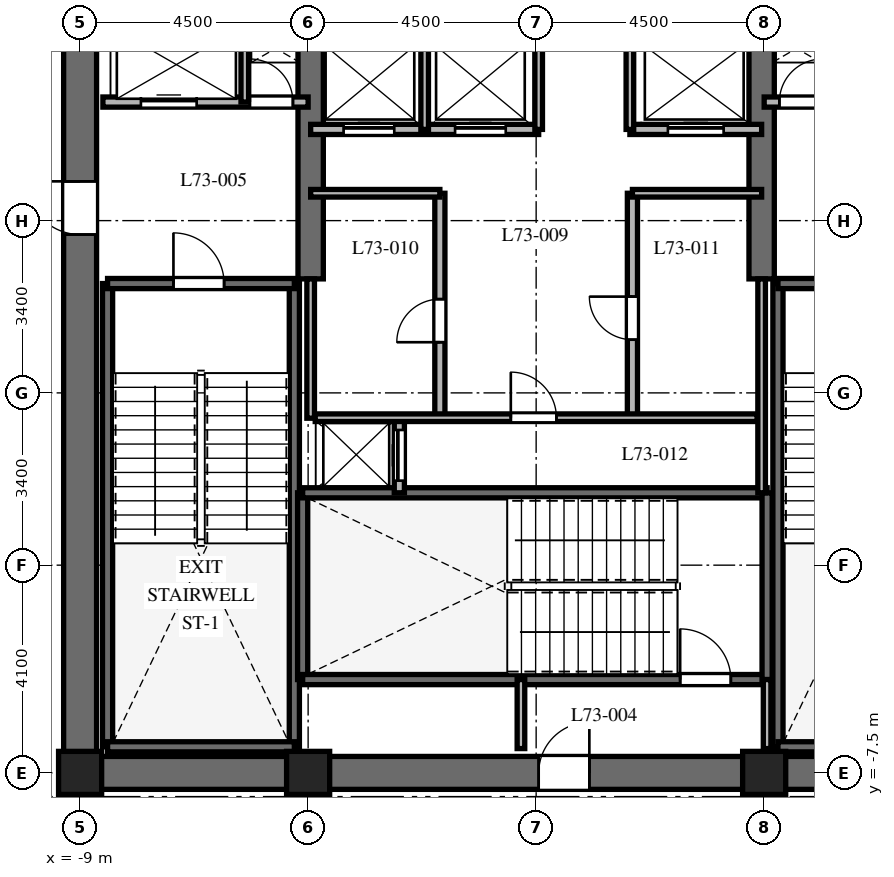
"""IFC4 building model, lengths in metres.
Left out: names, types, materials, properties, quantities, classifications, styles, units other than length and angle.
Written with IfcOpenShell. Run it as: python <this file> out.ifc"""

import sys

from ifc_helpers import new_model, si_unit, direction, frame, frame_2d, origin, origin_2d, place, context, subcontext, project, spatial, rectangle, extrude, element, fill, save


model = new_model("IFC4")
c1 = context("Model", 3, precision=1e-05, world=origin(), true_north=direction((0.0, 1.0)))
c2 = subcontext(c1, "Body", "Model", "MODEL_VIEW")
j1 = project(units=[si_unit("LENGTHUNIT", "METRE"), si_unit("PLANEANGLEUNIT", "RADIAN")], contexts=[c1])
p1 = place(None, origin())
s1 = spatial("IfcSite", under=j1, at=p1, CompositionType="ELEMENT")
p2 = place(p1, origin())
s2 = spatial("IfcBuilding", under=s1, at=p2, CompositionType="ELEMENT")
p3 = place(p2, frame((0.0, 0.0, 293.1)))
s3 = spatial("IfcBuildingStorey", under=s2, at=p3, CompositionType="ELEMENT", Elevation=293.1)
p4 = place(p3, frame((-9.325, -7.5, 0.0), z_axis=(0.0, 0.0, 1.0), x_axis=(1.0, 0.0, 0.0)))
e1 = element("IfcWall", 1, at=p4, inside=s3, PredefinedType="SHEAR", context=c2, shape_type="SweptSolid", body=[
    extrude(rectangle(XDim=18.65, YDim=0.65, at=frame_2d((9.325, 0.0))), origin(), (0.0, 0.0, 1.0), 4.5),
])
p5 = place(p4, frame((9.375, 0.0, 0.0)))
e2 = element("IfcOpeningElement", 2, at=p5, cuts=e1, PredefinedType="OPENING", context=c2, shape_type="SweptSolid", body=[
    extrude(rectangle(XDim=1.0, YDim=2.15, at=frame_2d((0.5, 1.075))), frame((0.0, 0.335, 0.0), z_axis=(0.0, -1.0, 0.0), x_axis=(1.0, 0.0, 0.0)), (0.0, 0.0, 1.0), 0.67),
])
p6 = place(p3, frame((-9.0, -7.175, 0.0), z_axis=(0.0, 0.0, 1.0), x_axis=(0.0, 1.0, 0.0)))
e3 = element("IfcWall", 3, at=p6, inside=s3, PredefinedType="SHEAR", context=c2, shape_type="SweptSolid", body=[
    extrude(rectangle(XDim=14.35, YDim=0.65, at=frame_2d((7.175, 0.0))), origin(), (0.0, 0.0, 1.0), 4.5),
])
p7 = place(p6, frame((10.3, 0.0, 0.0)))
e4 = element("IfcOpeningElement", 4, at=p7, cuts=e3, PredefinedType="OPENING", context=c2, shape_type="SweptSolid", body=[
    extrude(rectangle(XDim=1.05, YDim=2.15, at=frame_2d((0.525, 1.075))), frame((0.0, 0.335, 0.0), z_axis=(0.0, -1.0, 0.0), x_axis=(1.0, 0.0, 0.0)), (0.0, 0.0, 1.0), 0.67),
])
for number, where, z_axis, x_axis in (
    (5, (-4.45, 2.25, 0.0), (0.0, 0.0, 1.0), (0.0, 1.0, 0.0)),
    (6, (4.45, 2.25, 0.0), (0.0, 0.0, 1.0), (0.0, 1.0, 0.0)),
):
    element("IfcWall", number, at=place(p3, frame(where, z_axis=z_axis, x_axis=x_axis)), inside=s3, PredefinedType="SHEAR", context=c2, shape_type="SweptSolid", body=[
        extrude(rectangle(XDim=4.925, YDim=0.5, at=frame_2d((2.462, 0.0))), origin(), (0.0, 0.0, 1.0), 4.5),
    ])
for number, where, z_axis, x_axis in (
    (7, (-8.458, -6.985, 0.0), (0.0, 0.0, 1.0), (0.0, 1.0, 0.0)),
    (8, (-4.772, -6.985, 0.0), (0.0, 0.0, 1.0), (0.0, 1.0, 0.0)),
):
    element("IfcWall", number, at=place(p3, frame(where, z_axis=z_axis, x_axis=x_axis)), inside=s3, PredefinedType="SHEAR", context=c2, shape_type="SweptSolid", body=[
        extrude(rectangle(XDim=9.143, YDim=0.2, at=frame_2d((4.572, 0.0))), origin(), (0.0, 0.0, 1.0), 4.5),
    ])
p8 = place(p3, frame((-8.458, -6.985, 0.0), z_axis=(0.0, 0.0, 1.0), x_axis=(1.0, 0.0, 0.0)))
e9 = element("IfcWall", 9, at=p8, inside=s3, PredefinedType="SHEAR", context=c2, shape_type="SweptSolid", body=[
    extrude(rectangle(XDim=3.686, YDim=0.2, at=frame_2d((1.843, 0.0))), origin(), (0.0, 0.0, 1.0), 4.5),
])
p9 = place(p3, frame((-8.458, 2.158, 0.0), z_axis=(0.0, 0.0, 1.0), x_axis=(1.0, 0.0, 0.0)))
e10 = element("IfcWall", 10, at=p9, inside=s3, PredefinedType="SHEAR", context=c2, shape_type="SweptSolid", body=[
    extrude(rectangle(XDim=3.686, YDim=0.2, at=frame_2d((1.843, 0.0))), origin(), (0.0, 0.0, 1.0), 4.5),
])
p10 = place(p9, frame((1.3, 0.0, 0.0)))
e11 = element("IfcOpeningElement", 11, at=p10, cuts=e10, PredefinedType="OPENING", context=c2, shape_type="SweptSolid", body=[
    extrude(rectangle(XDim=1.0, YDim=2.15, at=frame_2d((0.5, 1.075))), frame((0.0, 0.11, 0.0), z_axis=(0.0, -1.0, 0.0), x_axis=(1.0, 0.0, 0.0)), (0.0, 0.0, 1.0), 0.22),
])
p11 = place(p3, frame((4.772, -6.985, 0.0), z_axis=(0.0, 0.0, 1.0), x_axis=(0.0, 1.0, 0.0)))
e12 = element("IfcWall", 12, at=p11, inside=s3, PredefinedType="SHEAR", context=c2, shape_type="SweptSolid", body=[
    extrude(rectangle(XDim=9.143, YDim=0.2, at=frame_2d((4.572, 0.0))), origin(), (0.0, 0.0, 1.0), 4.5),
])
p12 = place(p3, frame((4.772, -6.985, 0.0), z_axis=(0.0, 0.0, 1.0), x_axis=(1.0, 0.0, 0.0)))
e13 = element("IfcWall", 13, at=p12, inside=s3, PredefinedType="SHEAR", context=c2, shape_type="SweptSolid", body=[
    extrude(rectangle(XDim=3.686, YDim=0.2, at=frame_2d((1.843, 0.0))), origin(), (0.0, 0.0, 1.0), 4.5),
])
p13 = place(p3, frame((4.772, 2.158, 0.0), z_axis=(0.0, 0.0, 1.0), x_axis=(1.0, 0.0, 0.0)))
e14 = element("IfcWall", 14, at=p13, inside=s3, PredefinedType="SHEAR", context=c2, shape_type="SweptSolid", body=[
    extrude(rectangle(XDim=3.686, YDim=0.2, at=frame_2d((1.843, 0.0))), origin(), (0.0, 0.0, 1.0), 4.5),
])
p14 = place(p13, frame((1.35, 0.0, 0.0)))
e15 = element("IfcOpeningElement", 15, at=p14, cuts=e14, PredefinedType="OPENING", context=c2, shape_type="SweptSolid", body=[
    extrude(rectangle(XDim=1.0, YDim=2.15, at=frame_2d((0.5, 1.075))), frame((0.0, 0.11, 0.0), z_axis=(0.0, -1.0, 0.0), x_axis=(1.0, 0.0, 0.0)), (0.0, 0.0, 1.0), 0.22),
])
p15 = place(p3, frame((-4.608, -5.658, 0.0), z_axis=(0.0, 0.0, 1.0), x_axis=(0.0, 1.0, 0.0)))
e16 = element("IfcWall", 16, at=p15, inside=s3, PredefinedType="SHEAR", context=c2, shape_type="SweptSolid", body=[
    extrude(rectangle(XDim=3.686, YDim=0.2, at=frame_2d((1.843, 0.0))), origin(), (0.0, 0.0, 1.0), 4.5),
])
p16 = place(p3, frame((-4.608, -5.658, 0.0), z_axis=(0.0, 0.0, 1.0), x_axis=(1.0, 0.0, 0.0)))
e17 = element("IfcWall", 17, at=p16, inside=s3, PredefinedType="SHEAR", context=c2, shape_type="SweptSolid", body=[
    extrude(rectangle(XDim=9.166, YDim=0.2, at=frame_2d((4.583, 0.0))), origin(), (0.0, 0.0, 1.0), 4.5),
])
p17 = place(p16, frame((7.45, 0.0, 0.0)))
e18 = element("IfcOpeningElement", 18, at=p17, cuts=e17, PredefinedType="OPENING", context=c2, shape_type="SweptSolid", body=[
    extrude(rectangle(XDim=1.0, YDim=2.15, at=frame_2d((0.5, 1.075))), frame((0.0, 0.11, 0.0), z_axis=(0.0, -1.0, 0.0), x_axis=(1.0, 0.0, 0.0)), (0.0, 0.0, 1.0), 0.22),
])
p18 = place(p3, frame((-4.608, -1.972, 0.0), z_axis=(0.0, 0.0, 1.0), x_axis=(1.0, 0.0, 0.0)))
e19 = element("IfcWall", 19, at=p18, inside=s3, PredefinedType="SHEAR", context=c2, shape_type="SweptSolid", body=[
    extrude(rectangle(XDim=9.166, YDim=0.2, at=frame_2d((4.583, 0.0))), origin(), (0.0, 0.0, 1.0), 4.5),
])
p19 = place(p3, frame((4.558, -5.658, 0.0), z_axis=(0.0, 0.0, 1.0), x_axis=(0.0, 1.0, 0.0)))
e20 = element("IfcWall", 20, at=p19, inside=s3, PredefinedType="SHEAR", context=c2, shape_type="SweptSolid", body=[
    extrude(rectangle(XDim=3.686, YDim=0.2, at=frame_2d((1.843, 0.0))), origin(), (0.0, 0.0, 1.0), 4.5),
])
for number, where, z_axis, x_axis in (
    (21, (-9.0, -7.5, 0.0), (0.0, 0.0, 1.0), (1.0, 0.0, 0.0)),
    (22, (-4.5, -7.5, 0.0), (0.0, 0.0, 1.0), (1.0, 0.0, 0.0)),
    (23, (4.5, -7.5, 0.0), (0.0, 0.0, 1.0), (1.0, 0.0, 0.0)),
):
    element("IfcColumn", number, at=place(p3, frame(where, z_axis=z_axis, x_axis=x_axis)), inside=s3, PredefinedType="COLUMN", context=c2, shape_type="SweptSolid", body=[
        extrude(rectangle(XDim=0.85, YDim=0.85, at=origin_2d()), origin(), (0.0, 0.0, 1.0), 4.5),
    ])
for number, where, z_axis, x_axis in (
    (24, (-0.3, -7.02, 0.0), (0.0, 0.0, 1.0), (0.0, 1.0, 0.0)),
    (25, (4.558, -7.02, 0.0), (0.0, 0.0, 1.0), (0.0, 1.0, 0.0)),
):
    element("IfcWall", number, at=place(p3, frame(where, z_axis=z_axis, x_axis=x_axis)), inside=s3, PredefinedType="PARTITIONING", context=c2, shape_type="SweptSolid", body=[
        extrude(rectangle(XDim=1.362, YDim=0.15, at=frame_2d((0.681, 0.0))), origin(), (0.0, 0.0, 1.0), 4.18),
    ])
p20 = place(p3, frame((-8.55, 5.74, 0.0), z_axis=(0.0, 0.0, 1.0), x_axis=(1.0, 0.0, 0.0)))
e26 = element("IfcWall", 26, at=p20, inside=s3, PredefinedType="PARTITIONING", context=c2, shape_type="SweptSolid", body=[
    extrude(rectangle(XDim=4.05, YDim=0.2, at=frame_2d((2.025, 0.0))), origin(), (0.0, 0.0, 1.0), 4.18),
])
p21 = place(p20, frame((0.75, 0.0, 0.0)))
e27 = element("IfcOpeningElement", 27, at=p21, cuts=e26, PredefinedType="OPENING", context=c2, shape_type="SweptSolid", body=[
    extrude(rectangle(XDim=1.1, YDim=2.2, at=frame_2d((0.55, 1.1))), frame((0.0, 0.11, 0.0), z_axis=(0.0, -1.0, 0.0), x_axis=(1.0, 0.0, 0.0)), (0.0, 0.0, 1.0), 0.22),
])
p22 = place(p20, frame((2.9, 0.0, 0.0)))
e28 = element("IfcOpeningElement", 28, at=p22, cuts=e26, PredefinedType="OPENING", context=c2, shape_type="SweptSolid", body=[
    extrude(rectangle(XDim=0.85, YDim=2.03, at=frame_2d((0.425, 1.015))), frame((0.0, 0.11, 0.0), z_axis=(0.0, -1.0, 0.0), x_axis=(1.0, 0.0, 0.0)), (0.0, 0.0, 1.0), 0.22),
])
p23 = place(p3, frame((-5.75, 5.74, 0.0), z_axis=(0.0, 0.0, 1.0), x_axis=(0.0, 1.0, 0.0)))
e29 = element("IfcWall", 29, at=p23, inside=s3, PredefinedType="PARTITIONING", context=c2, shape_type="SweptSolid", body=[
    extrude(rectangle(XDim=1.41, YDim=0.15, at=frame_2d((0.705, 0.0))), origin(), (0.0, 0.0, 1.0), 4.18),
])
p24 = place(p3, frame((4.5, 5.74, 0.0), z_axis=(0.0, 0.0, 1.0), x_axis=(1.0, 0.0, 0.0)))
e30 = element("IfcWall", 30, at=p24, inside=s3, PredefinedType="PARTITIONING", context=c2, shape_type="SweptSolid", body=[
    extrude(rectangle(XDim=4.05, YDim=0.2, at=frame_2d((2.025, 0.0))), origin(), (0.0, 0.0, 1.0), 4.18),
])
p25 = place(p24, frame((0.3, 0.0, 0.0)))
e31 = element("IfcOpeningElement", 31, at=p25, cuts=e30, PredefinedType="OPENING", context=c2, shape_type="SweptSolid", body=[
    extrude(rectangle(XDim=0.85, YDim=2.03, at=frame_2d((0.425, 1.015))), frame((0.0, 0.11, 0.0), z_axis=(0.0, -1.0, 0.0), x_axis=(1.0, 0.0, 0.0)), (0.0, 0.0, 1.0), 0.22),
])
p26 = place(p24, frame((2.15, 0.0, 0.0)))
e32 = element("IfcOpeningElement", 32, at=p26, cuts=e30, PredefinedType="OPENING", context=c2, shape_type="SweptSolid", body=[
    extrude(rectangle(XDim=1.1, YDim=2.2, at=frame_2d((0.55, 1.1))), frame((0.0, 0.11, 0.0), z_axis=(0.0, -1.0, 0.0), x_axis=(1.0, 0.0, 0.0)), (0.0, 0.0, 1.0), 0.22),
])
p27 = place(p3, frame((-2.7, -1.972, 0.0), z_axis=(0.0, 0.0, 1.0), x_axis=(0.0, 1.0, 0.0)))
e33 = element("IfcWall", 33, at=p27, inside=s3, PredefinedType="PARTITIONING", context=c2, shape_type="SweptSolid", body=[
    extrude(rectangle(XDim=1.472, YDim=0.2, at=frame_2d((0.736, 0.0))), origin(), (0.0, 0.0, 1.0), 4.18),
])
p28 = place(p27, frame((0.24, 0.0, 0.0)))
e34 = element("IfcOpeningElement", 34, at=p28, cuts=e33, PredefinedType="OPENING", context=c2, shape_type="SweptSolid", body=[
    extrude(rectangle(XDim=1.0, YDim=2.2, at=frame_2d((0.5, 1.1))), frame((0.0, 0.11, 0.0), z_axis=(0.0, -1.0, 0.0), x_axis=(1.0, 0.0, 0.0)), (0.0, 0.0, 1.0), 0.22),
])
p29 = place(p3, frame((-4.45, 5.2, 0.0), z_axis=(0.0, 0.0, 1.0), x_axis=(1.0, 0.0, 0.0)))
e35 = element("IfcWall", 35, at=p29, inside=s3, PredefinedType="PARTITIONING", context=c2, shape_type="SweptSolid", body=[
    extrude(rectangle(XDim=4.5, YDim=0.2, at=frame_2d((2.25, 0.0))), origin(), (0.0, 0.0, 1.0), 4.18),
])
p30 = place(p29, frame((0.65, 0.0, 0.0)))
e36 = element("IfcOpeningElement", 36, at=p30, cuts=e35, PredefinedType="OPENING", context=c2, shape_type="SweptSolid", body=[
    extrude(rectangle(XDim=1.0, YDim=2.2, at=frame_2d((0.5, 1.1))), frame((0.0, 0.11, 0.0), z_axis=(0.0, -1.0, 0.0), x_axis=(1.0, 0.0, 0.0)), (0.0, 0.0, 1.0), 0.22),
])
p31 = place(p29, frame((2.85, 0.0, 0.0)))
e37 = element("IfcOpeningElement", 37, at=p31, cuts=e35, PredefinedType="OPENING", context=c2, shape_type="SweptSolid", body=[
    extrude(rectangle(XDim=1.0, YDim=2.2, at=frame_2d((0.5, 1.1))), frame((0.0, 0.11, 0.0), z_axis=(0.0, -1.0, 0.0), x_axis=(1.0, 0.0, 0.0)), (0.0, 0.0, 1.0), 0.22),
])
p32 = place(p3, frame((1.85, 5.2, 0.0), z_axis=(0.0, 0.0, 1.0), x_axis=(1.0, 0.0, 0.0)))
e38 = element("IfcWall", 38, at=p32, inside=s3, PredefinedType="PARTITIONING", context=c2, shape_type="SweptSolid", body=[
    extrude(rectangle(XDim=2.6, YDim=0.2, at=frame_2d((1.3, 0.0))), origin(), (0.0, 0.0, 1.0), 4.18),
])
p33 = place(p32, frame((0.75, 0.0, 0.0)))
e39 = element("IfcOpeningElement", 39, at=p33, cuts=e38, PredefinedType="OPENING", context=c2, shape_type="SweptSolid", body=[
    extrude(rectangle(XDim=1.1, YDim=2.2, at=frame_2d((0.55, 1.1))), frame((0.0, 0.11, 0.0), z_axis=(0.0, -1.0, 0.0), x_axis=(1.0, 0.0, 0.0)), (0.0, 0.0, 1.0), 0.22),
])
p34 = place(p3, frame((-2.2, 5.2, 0.0), z_axis=(0.0, 0.0, 1.0), x_axis=(0.0, 1.0, 0.0)))
e40 = element("IfcWall", 40, at=p34, inside=s3, PredefinedType="PARTITIONING", context=c2, shape_type="SweptSolid", body=[
    extrude(rectangle(XDim=1.85, YDim=0.15, at=frame_2d((0.925, 0.0))), origin(), (0.0, 0.0, 1.0), 4.18),
])
for number, where, z_axis, x_axis in (
    (41, (0.05, 5.2, 0.0), (0.0, 0.0, 1.0), (0.0, 1.0, 0.0)),
    (42, (1.85, 5.2, 0.0), (0.0, 0.0, 1.0), (0.0, 1.0, 0.0)),
):
    element("IfcWall", number, at=place(p3, frame(where, z_axis=z_axis, x_axis=x_axis)), inside=s3, PredefinedType="PARTITIONING", context=c2, shape_type="SweptSolid", body=[
        extrude(rectangle(XDim=1.95, YDim=0.15, at=frame_2d((0.975, 0.0))), origin(), (0.0, 0.0, 1.0), 4.18),
    ])
p35 = place(p3, frame((-4.45, -0.5, 0.0), z_axis=(0.0, 0.0, 1.0), x_axis=(0.0, 1.0, 0.0)))
e43 = element("IfcWall", 43, at=p35, inside=s3, PredefinedType="PARTITIONING", context=c2, shape_type="SweptSolid", body=[
    extrude(rectangle(XDim=2.75, YDim=0.15, at=frame_2d((1.375, 0.0))), origin(), (0.0, 0.0, 1.0), 4.18),
])
p36 = place(p3, frame((4.45, -1.972, 0.0), z_axis=(0.0, 0.0, 1.0), x_axis=(0.0, 1.0, 0.0)))
e44 = element("IfcWall", 44, at=p36, inside=s3, PredefinedType="PARTITIONING", context=c2, shape_type="SweptSolid", body=[
    extrude(rectangle(XDim=4.222, YDim=0.15, at=frame_2d((2.111, 0.0))), origin(), (0.0, 0.0, 1.0), 4.18),
])
p37 = place(p3, frame((-1.9, -0.5, 0.0), z_axis=(0.0, 0.0, 1.0), x_axis=(0.0, 1.0, 0.0)))
e45 = element("IfcWall", 45, at=p37, inside=s3, PredefinedType="PARTITIONING", context=c2, shape_type="SweptSolid", body=[
    extrude(rectangle(XDim=4.44, YDim=0.2, at=frame_2d((2.22, 0.0))), origin(), (0.0, 0.0, 1.0), 4.18),
])
p38 = place(p37, frame((1.5, 0.0, 0.0)))
e46 = element("IfcOpeningElement", 46, at=p38, cuts=e45, PredefinedType="OPENING", context=c2, shape_type="SweptSolid", body=[
    extrude(rectangle(XDim=0.85, YDim=2.03, at=frame_2d((0.425, 1.015))), frame((0.0, 0.11, 0.0), z_axis=(0.0, -1.0, 0.0), x_axis=(1.0, 0.0, 0.0)), (0.0, 0.0, 1.0), 0.22),
])
p39 = place(p3, frame((-4.45, 3.94, 0.0), z_axis=(0.0, 0.0, 1.0), x_axis=(1.0, 0.0, 0.0)))
e47 = element("IfcWall", 47, at=p39, inside=s3, PredefinedType="PARTITIONING", context=c2, shape_type="SweptSolid", body=[
    extrude(rectangle(XDim=2.55, YDim=0.15, at=frame_2d((1.275, 0.0))), origin(), (0.0, 0.0, 1.0), 4.18),
])
p40 = place(p3, frame((1.9, -0.5, 0.0), z_axis=(0.0, 0.0, 1.0), x_axis=(0.0, 1.0, 0.0)))
e48 = element("IfcWall", 48, at=p40, inside=s3, PredefinedType="PARTITIONING", context=c2, shape_type="SweptSolid", body=[
    extrude(rectangle(XDim=4.44, YDim=0.2, at=frame_2d((2.22, 0.0))), origin(), (0.0, 0.0, 1.0), 4.18),
])
p41 = place(p40, frame((1.55, 0.0, 0.0)))
e49 = element("IfcOpeningElement", 49, at=p41, cuts=e48, PredefinedType="OPENING", context=c2, shape_type="SweptSolid", body=[
    extrude(rectangle(XDim=0.85, YDim=2.03, at=frame_2d((0.425, 1.015))), frame((0.0, 0.11, 0.0), z_axis=(0.0, -1.0, 0.0), x_axis=(1.0, 0.0, 0.0)), (0.0, 0.0, 1.0), 0.22),
])
p42 = place(p3, frame((1.9, 3.94, 0.0), z_axis=(0.0, 0.0, 1.0), x_axis=(1.0, 0.0, 0.0)))
e50 = element("IfcWall", 50, at=p42, inside=s3, PredefinedType="PARTITIONING", context=c2, shape_type="SweptSolid", body=[
    extrude(rectangle(XDim=2.55, YDim=0.15, at=frame_2d((1.275, 0.0))), origin(), (0.0, 0.0, 1.0), 4.18),
])
p43 = place(p3, frame((-4.36, -0.49, 0.0), z_axis=(0.0, 0.0, 1.0), x_axis=(1.0, 0.0, 0.0)))
e51 = element("IfcWall", 51, at=p43, inside=s3, PredefinedType="PARTITIONING", context=c2, shape_type="SweptSolid", body=[
    extrude(rectangle(XDim=8.72, YDim=0.15, at=frame_2d((4.36, 0.0))), origin(), (0.0, 0.0, 1.0), 4.18),
])
p44 = place(p43, frame((3.86, 0.0, 0.0)))
e52 = element("IfcOpeningElement", 52, at=p44, cuts=e51, PredefinedType="OPENING", context=c2, shape_type="SweptSolid", body=[
    extrude(rectangle(XDim=0.9, YDim=2.03, at=frame_2d((0.45, 1.015))), frame((0.0, 0.085, 0.0), z_axis=(0.0, -1.0, 0.0), x_axis=(1.0, 0.0, 0.0)), (0.0, 0.0, 1.0), 0.17),
])
p45 = place(p10, origin())
e53 = element("IfcDoor", 53, at=p45, inside=s3, OperationType="SINGLE_SWING_LEFT", PredefinedType="DOOR", context=c2, shape_type="SweptSolid", body=[
    extrude(rectangle(XDim=1.0, YDim=2.15, at=frame_2d((0.5, 1.075))), frame((0.0, 0.025, 0.0), z_axis=(0.0, -1.0, 0.0), x_axis=(1.0, 0.0, 0.0)), (0.0, 0.0, 1.0), 0.05),
])
fill(e11, e53)
p46 = place(p17, origin())
e54 = element("IfcDoor", 54, at=p46, inside=s3, OperationType="SINGLE_SWING_LEFT", PredefinedType="DOOR", context=c2, shape_type="SweptSolid", body=[
    extrude(rectangle(XDim=1.0, YDim=2.15, at=frame_2d((0.5, 1.075))), frame((0.0, 0.025, 0.0), z_axis=(0.0, -1.0, 0.0), x_axis=(1.0, 0.0, 0.0)), (0.0, 0.0, 1.0), 0.05),
])
fill(e18, e54)
p47 = place(p5, origin())
e55 = element("IfcDoor", 55, at=p47, inside=s3, OperationType="SINGLE_SWING_RIGHT", PredefinedType="DOOR", context=c2, shape_type="SweptSolid", body=[
    extrude(rectangle(XDim=1.0, YDim=2.15, at=frame_2d((0.5, 1.075))), frame((0.0, 0.025, 0.0), z_axis=(0.0, -1.0, 0.0), x_axis=(1.0, 0.0, 0.0)), (0.0, 0.0, 1.0), 0.05),
])
fill(e2, e55)
p48 = place(p7, origin())
e56 = element("IfcDoor", 56, at=p48, inside=s3, OperationType="SINGLE_SWING_RIGHT", PredefinedType="DOOR", context=c2, shape_type="SweptSolid", body=[
    extrude(rectangle(XDim=1.05, YDim=2.15, at=frame_2d((0.525, 1.075))), frame((0.0, 0.025, 0.0), z_axis=(0.0, -1.0, 0.0), x_axis=(1.0, 0.0, 0.0)), (0.0, 0.0, 1.0), 0.05),
])
fill(e4, e56)
p49 = place(p21, origin())
e57 = element("IfcDoor", 57, at=p49, inside=s3, OperationType="SLIDING_TO_LEFT", PredefinedType="DOOR", context=c2, shape_type="SweptSolid", body=[
    extrude(rectangle(XDim=1.1, YDim=2.2, at=frame_2d((0.55, 1.1))), frame((0.0, 0.025, 0.0), z_axis=(0.0, -1.0, 0.0), x_axis=(1.0, 0.0, 0.0)), (0.0, 0.0, 1.0), 0.05),
])
fill(e27, e57)
p50 = place(p22, origin())
e58 = element("IfcDoor", 58, at=p50, inside=s3, OperationType="SINGLE_SWING_LEFT", PredefinedType="DOOR", context=c2, shape_type="SweptSolid", body=[
    extrude(rectangle(XDim=0.85, YDim=2.03, at=frame_2d((0.425, 1.015))), frame((0.0, 0.025, 0.0), z_axis=(0.0, -1.0, 0.0), x_axis=(1.0, 0.0, 0.0)), (0.0, 0.0, 1.0), 0.05),
])
fill(e28, e58)
p51 = place(p25, origin())
e59 = element("IfcDoor", 59, at=p51, inside=s3, OperationType="SINGLE_SWING_RIGHT", PredefinedType="DOOR", context=c2, shape_type="SweptSolid", body=[
    extrude(rectangle(XDim=0.85, YDim=2.03, at=frame_2d((0.425, 1.015))), frame((0.0, 0.025, 0.0), z_axis=(0.0, -1.0, 0.0), x_axis=(1.0, 0.0, 0.0)), (0.0, 0.0, 1.0), 0.05),
])
fill(e31, e59)
p52 = place(p28, origin())
e60 = element("IfcDoor", 60, at=p52, inside=s3, OperationType="SLIDING_TO_LEFT", PredefinedType="DOOR", context=c2, shape_type="SweptSolid", body=[
    extrude(rectangle(XDim=1.0, YDim=2.2, at=frame_2d((0.5, 1.1))), frame((0.0, 0.025, 0.0), z_axis=(0.0, -1.0, 0.0), x_axis=(1.0, 0.0, 0.0)), (0.0, 0.0, 1.0), 0.05),
])
fill(e34, e60)
p53 = place(p30, origin())
e61 = element("IfcDoor", 61, at=p53, inside=s3, OperationType="SLIDING_TO_LEFT", PredefinedType="DOOR", context=c2, shape_type="SweptSolid", body=[
    extrude(rectangle(XDim=1.0, YDim=2.2, at=frame_2d((0.5, 1.1))), frame((0.0, 0.025, 0.0), z_axis=(0.0, -1.0, 0.0), x_axis=(1.0, 0.0, 0.0)), (0.0, 0.0, 1.0), 0.05),
])
fill(e36, e61)
p54 = place(p31, origin())
e62 = element("IfcDoor", 62, at=p54, inside=s3, OperationType="SLIDING_TO_RIGHT", PredefinedType="DOOR", context=c2, shape_type="SweptSolid", body=[
    extrude(rectangle(XDim=1.0, YDim=2.2, at=frame_2d((0.5, 1.1))), frame((0.0, 0.025, 0.0), z_axis=(0.0, -1.0, 0.0), x_axis=(1.0, 0.0, 0.0)), (0.0, 0.0, 1.0), 0.05),
])
fill(e37, e62)
p55 = place(p33, origin())
e63 = element("IfcDoor", 63, at=p55, inside=s3, OperationType="SLIDING_TO_RIGHT", PredefinedType="DOOR", context=c2, shape_type="SweptSolid", body=[
    extrude(rectangle(XDim=1.1, YDim=2.2, at=frame_2d((0.55, 1.1))), frame((0.0, 0.025, 0.0), z_axis=(0.0, -1.0, 0.0), x_axis=(1.0, 0.0, 0.0)), (0.0, 0.0, 1.0), 0.05),
])
fill(e39, e63)
p56 = place(p38, origin())
e64 = element("IfcDoor", 64, at=p56, inside=s3, OperationType="SINGLE_SWING_LEFT", PredefinedType="DOOR", context=c2, shape_type="SweptSolid", body=[
    extrude(rectangle(XDim=0.85, YDim=2.03, at=frame_2d((0.425, 1.015))), frame((0.0, 0.025, 0.0), z_axis=(0.0, -1.0, 0.0), x_axis=(1.0, 0.0, 0.0)), (0.0, 0.0, 1.0), 0.05),
])
fill(e46, e64)
p57 = place(p41, origin())
e65 = element("IfcDoor", 65, at=p57, inside=s3, OperationType="SINGLE_SWING_RIGHT", PredefinedType="DOOR", context=c2, shape_type="SweptSolid", body=[
    extrude(rectangle(XDim=0.85, YDim=2.03, at=frame_2d((0.425, 1.015))), frame((0.0, 0.025, 0.0), z_axis=(0.0, -1.0, 0.0), x_axis=(1.0, 0.0, 0.0)), (0.0, 0.0, 1.0), 0.05),
])
fill(e49, e65)
p58 = place(p44, origin())
e66 = element("IfcDoor", 66, at=p58, inside=s3, OperationType="SINGLE_SWING_LEFT", PredefinedType="DOOR", context=c2, shape_type="SweptSolid", body=[
    extrude(rectangle(XDim=0.9, YDim=2.03, at=frame_2d((0.45, 1.015))), frame((0.0, 0.025, 0.0), z_axis=(0.0, -1.0, 0.0), x_axis=(1.0, 0.0, 0.0)), (0.0, 0.0, 1.0), 0.05),
])
fill(e52, e66)
save(model, sys.argv[1])
